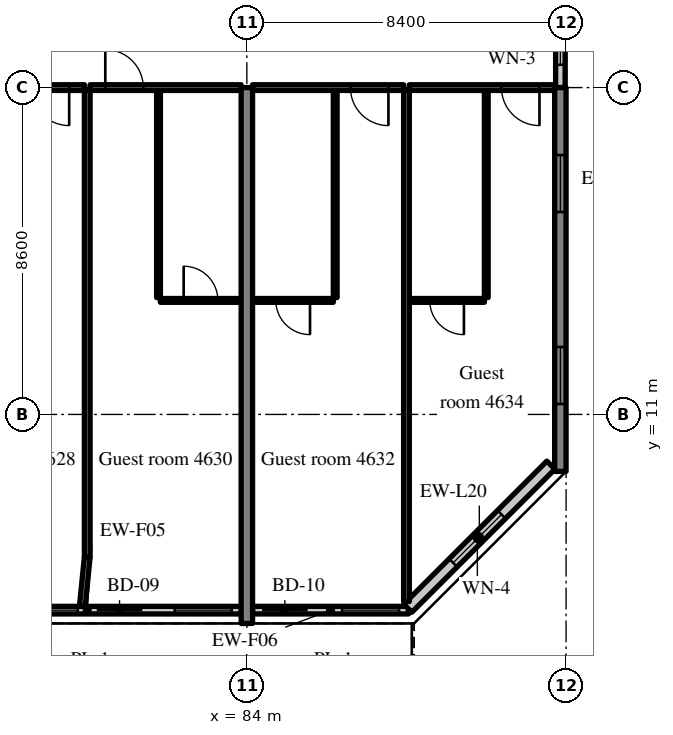
"""IFC4 building model, lengths in metres.
Left out: names, types, materials, properties, quantities, classifications, styles, units other than length and angle.
Written with IfcOpenShell. Run it as: python <this file> out.ifc"""

import sys

from ifc_helpers import new_model, si_unit, direction, frame, frame_2d, origin, place, context, subcontext, project, spatial, rectangle, extrude, source, transform, mapped, element, fill, save


model = new_model("IFC4")
c1 = context("Model", 3, precision=1e-05, world=origin(), true_north=direction((0.0, 1.0)))
c2 = subcontext(c1, "Body", "Model", "MODEL_VIEW")
j1 = project(units=[si_unit("LENGTHUNIT", "METRE"), si_unit("PLANEANGLEUNIT", "RADIAN")], contexts=[c1])
p1 = place(None, origin())
s1 = spatial("IfcSite", under=j1, at=p1, CompositionType="ELEMENT")
p2 = place(p1, origin())
s2 = spatial("IfcBuilding", under=s1, at=p2, CompositionType="ELEMENT")
p3 = place(p2, frame((0.0, 0.0, 189.6)))
s3 = spatial("IfcBuildingStorey", under=s2, at=p3, CompositionType="ELEMENT", Elevation=189.6)
m1 = source(origin(), c2, "Body", "SweptSolid", [
    extrude(rectangle(XDim=14.1, YDim=0.3, at=frame_2d((7.05, 0.0))), origin(), (0.0, 0.0, 1.0), 3.52),
])
p4 = place(p3, frame((84.0, 5.5, 0.0), z_axis=(0.0, 0.0, 1.0), x_axis=(0.0, 1.0, 0.0)))
e1 = element("IfcWall", 1, at=p4, inside=s3, PredefinedType="SHEAR", context=c2, shape_type="MappedRepresentation", body=[
    mapped(m1, transform((0.0, 0.0, 0.0), scale=1.0)),
])
m2 = source(origin(), c2, "Body", "SweptSolid", [
    extrude(rectangle(XDim=10.1, YDim=0.3, at=frame_2d((5.05, 0.0))), origin(), (0.0, 0.0, 1.0), 3.52),
])
p5 = place(p3, frame((92.25, 9.5, 0.0), z_axis=(0.0, 0.0, 1.0), x_axis=(0.0, 1.0, 0.0)))
e2 = element("IfcWall", 2, at=p5, inside=s3, PredefinedType="SHEAR", context=c2, shape_type="MappedRepresentation", body=[
    mapped(m2, transform((0.0, 0.0, 0.0), scale=1.0)),
])
m3 = source(origin(), c2, "Body", "SweptSolid", [
    extrude(rectangle(XDim=1.5, YDim=1.5, at=frame_2d((0.75, 0.75))), frame((0.0, 0.16, 0.0), z_axis=(0.0, -1.0, 0.0), x_axis=(1.0, 0.0, 0.0)), (0.0, 0.0, 1.0), 0.32),
])
p6 = place(p5, frame((1.775, 0.0, 0.9)))
e3 = element("IfcOpeningElement", 3, at=p6, cuts=e2, PredefinedType="OPENING", context=c2, shape_type="MappedRepresentation", body=[
    mapped(m3, transform((0.0, 0.0, 0.0), scale=1.0)),
])
p7 = place(p5, frame((6.825, 0.0, 0.9)))
e4 = element("IfcOpeningElement", 4, at=p7, cuts=e2, PredefinedType="OPENING", context=c2, shape_type="MappedRepresentation", body=[
    mapped(m3, transform((0.0, 0.0, 0.0), scale=1.0)),
])
m4 = source(origin(), c2, "Body", "SweptSolid", [
    extrude(rectangle(XDim=8.1, YDim=0.2, at=frame_2d((4.05, 0.0))), origin(), (0.0, 0.0, 1.0), 2.87),
])
p8 = place(p3, frame((75.75, 5.85, 0.0), z_axis=(0.0, 0.0, 1.0), x_axis=(1.0, 0.0, 0.0)))
e5 = element("IfcWall", 5, at=p8, inside=s3, PredefinedType="SOLIDWALL", context=c2, shape_type="MappedRepresentation", body=[
    mapped(m4, transform((0.0, 0.0, 0.0), scale=1.0)),
])
m5 = source(origin(), c2, "Body", "SweptSolid", [
    extrude(rectangle(XDim=1.2, YDim=2.4, at=frame_2d((0.6, 1.2))), frame((0.0, 0.11, 0.0), z_axis=(0.0, -1.0, 0.0), x_axis=(1.0, 0.0, 0.0)), (0.0, 0.0, 1.0), 0.22),
])
p9 = place(p8, frame((0.25, 0.0, 0.0)))
e6 = element("IfcOpeningElement", 6, at=p9, cuts=e5, PredefinedType="OPENING", context=c2, shape_type="MappedRepresentation", body=[
    mapped(m5, transform((0.0, 0.0, 0.0), scale=1.0)),
])
m6 = source(origin(), c2, "Body", "SweptSolid", [
    extrude(rectangle(XDim=1.5, YDim=1.5, at=frame_2d((0.75, 0.75))), frame((0.0, 0.11, 0.0), z_axis=(0.0, -1.0, 0.0), x_axis=(1.0, 0.0, 0.0)), (0.0, 0.0, 1.0), 0.22),
])
p10 = place(p8, frame((2.3, 0.0, 0.9)))
e7 = element("IfcOpeningElement", 7, at=p10, cuts=e5, PredefinedType="OPENING", context=c2, shape_type="MappedRepresentation", body=[
    mapped(m6, transform((0.0, 0.0, 0.0), scale=1.0)),
])
p11 = place(p8, frame((4.3, 0.0, 0.0)))
e8 = element("IfcOpeningElement", 8, at=p11, cuts=e5, PredefinedType="OPENING", context=c2, shape_type="MappedRepresentation", body=[
    mapped(m5, transform((0.0, 0.0, 0.0), scale=1.0)),
])
p12 = place(p8, frame((6.35, 0.0, 0.9)))
e9 = element("IfcOpeningElement", 9, at=p12, cuts=e5, PredefinedType="OPENING", context=c2, shape_type="MappedRepresentation", body=[
    mapped(m6, transform((0.0, 0.0, 0.0), scale=1.0)),
])
m7 = source(origin(), c2, "Body", "SweptSolid", [
    extrude(rectangle(XDim=4.105, YDim=0.2, at=frame_2d((2.052, 0.0))), origin(), (0.0, 0.0, 1.0), 2.87),
])
p13 = place(p3, frame((84.15, 5.85, 0.0), z_axis=(0.0, 0.0, 1.0), x_axis=(1.0, 0.0, 0.0)))
e10 = element("IfcWall", 10, at=p13, inside=s3, PredefinedType="SOLIDWALL", context=c2, shape_type="MappedRepresentation", body=[
    mapped(m7, transform((0.0, 0.0, 0.0), scale=1.0)),
])
p14 = place(p13, frame((0.25, 0.0, 0.0)))
e11 = element("IfcOpeningElement", 11, at=p14, cuts=e10, PredefinedType="OPENING", context=c2, shape_type="MappedRepresentation", body=[
    mapped(m5, transform((0.0, 0.0, 0.0), scale=1.0)),
])
p15 = place(p13, frame((2.355, 0.0, 0.9)))
e12 = element("IfcOpeningElement", 12, at=p15, cuts=e10, PredefinedType="OPENING", context=c2, shape_type="MappedRepresentation", body=[
    mapped(m6, transform((0.0, 0.0, 0.0), scale=1.0)),
])
m8 = source(origin(), c2, "Body", "SweptSolid", [
    extrude(rectangle(XDim=5.326, YDim=0.3, at=frame_2d((2.663, 0.0))), origin(), (0.0, 0.0, 1.0), 3.52),
])
p16 = place(p3, frame((88.234, 5.9, 0.0), z_axis=(0.0, 0.0, 1.0), x_axis=(0.707083859269, 0.707129702361, 0.0)))
e13 = element("IfcWall", 13, at=p16, inside=s3, PredefinedType="SOLIDWALL", context=c2, shape_type="MappedRepresentation", body=[
    mapped(m8, transform((0.0, 0.0, 0.0), scale=1.0)),
])
m9 = source(origin(), c2, "Body", "SweptSolid", [
    extrude(rectangle(XDim=1.8, YDim=1.5, at=frame_2d((0.9, 0.75))), frame((0.0, 0.16, 0.0), z_axis=(0.0, -1.0, 0.0), x_axis=(1.0, 0.0, 0.0)), (0.0, 0.0, 1.0), 0.32),
])
p17 = place(p16, frame((1.689, 0.0, 0.9)))
e14 = element("IfcOpeningElement", 14, at=p17, cuts=e13, PredefinedType="OPENING", context=c2, shape_type="MappedRepresentation", body=[
    mapped(m9, transform((0.0, 0.0, 0.0), scale=1.0)),
])
m10 = source(origin(), c2, "Body", "SweptSolid", [
    extrude(rectangle(XDim=2.4, YDim=0.25, at=frame_2d((1.2, 0.0))), origin(), (0.0, 0.0, 1.0), 2.62),
])
p18 = place(p3, frame((92.25, 19.6, 0.0), z_axis=(0.0, 0.0, 1.0), x_axis=(0.0, 1.0, 0.0)))
e15 = element("IfcWall", 15, at=p18, inside=s3, PredefinedType="SOLIDWALL", context=c2, shape_type="MappedRepresentation", body=[
    mapped(m10, transform((0.0, 0.0, 0.0), scale=1.0)),
])
m11 = source(origin(), c2, "Body", "SweptSolid", [
    extrude(rectangle(XDim=1.2, YDim=1.5, at=frame_2d((0.6, 0.75))), frame((0.0, 0.135, 0.0), z_axis=(0.0, -1.0, 0.0), x_axis=(1.0, 0.0, 0.0)), (0.0, 0.0, 1.0), 0.27),
])
p19 = place(p18, frame((0.6, 0.0, 0.9)))
e16 = element("IfcOpeningElement", 16, at=p19, cuts=e15, PredefinedType="OPENING", context=c2, shape_type="MappedRepresentation", body=[
    mapped(m11, transform((0.0, 0.0, 0.0), scale=1.0)),
])
m12 = source(origin(), c2, "Body", "SweptSolid", [
    extrude(rectangle(XDim=3.975, YDim=0.15, at=frame_2d((1.988, 0.0))), origin(), (0.0, 0.0, 1.0), 2.82),
])
p20 = place(p3, frame((75.75, 19.6, 0.0), z_axis=(0.0, 0.0, 1.0), x_axis=(1.0, 0.0, 0.0)))
e17 = element("IfcWall", 17, at=p20, inside=s3, PredefinedType="PARTITIONING", context=c2, shape_type="MappedRepresentation", body=[
    mapped(m12, transform((0.0, 0.0, 0.0), scale=1.0)),
])
m13 = source(origin(), c2, "Body", "SweptSolid", [
    extrude(rectangle(XDim=1.0, YDim=2.1, at=frame_2d((0.5, 1.05))), frame((0.0, 0.085, 0.0), z_axis=(0.0, -1.0, 0.0), x_axis=(1.0, 0.0, 0.0)), (0.0, 0.0, 1.0), 0.17),
])
p21 = place(p20, frame((2.575, 0.0, 0.0)))
e18 = element("IfcOpeningElement", 18, at=p21, cuts=e17, PredefinedType="OPENING", context=c2, shape_type="MappedRepresentation", body=[
    mapped(m13, transform((0.0, 0.0, 0.0), scale=1.0)),
])
m14 = source(origin(), c2, "Body", "SweptSolid", [
    extrude(rectangle(XDim=5.45, YDim=0.1, at=frame_2d((2.725, 0.0))), origin(), (0.0, 0.0, 1.0), 3.52),
])
p22 = place(p3, frame((81.675, 14.075, 0.0), z_axis=(0.0, 0.0, 1.0), x_axis=(0.0, 1.0, 0.0)))
e19 = element("IfcWall", 19, at=p22, inside=s3, PredefinedType="PARTITIONING", context=c2, shape_type="MappedRepresentation", body=[
    mapped(m14, transform((0.0, 0.0, 0.0), scale=1.0)),
])
m15 = source(origin(), c2, "Body", "SweptSolid", [
    extrude(rectangle(XDim=2.125, YDim=0.1, at=frame_2d((1.062, 0.0))), origin(), (0.0, 0.0, 1.0), 3.52),
])
p23 = place(p3, frame((81.725, 14.0, 0.0), z_axis=(0.0, 0.0, 1.0), x_axis=(1.0, 0.0, 0.0)))
e20 = element("IfcWall", 20, at=p23, inside=s3, PredefinedType="PARTITIONING", context=c2, shape_type="MappedRepresentation", body=[
    mapped(m15, transform((0.0, 0.0, 0.0), scale=1.0)),
])
m16 = source(origin(), c2, "Body", "SweptSolid", [
    extrude(rectangle(XDim=0.9, YDim=2.1, at=frame_2d((0.45, 1.05))), frame((0.0, 0.06, 0.0), z_axis=(0.0, -1.0, 0.0), x_axis=(1.0, 0.0, 0.0)), (0.0, 0.0, 1.0), 0.12),
])
p24 = place(p23, frame((0.612, 0.0, 0.0)))
e21 = element("IfcOpeningElement", 21, at=p24, cuts=e20, PredefinedType="OPENING", context=c2, shape_type="MappedRepresentation", body=[
    mapped(m16, transform((0.0, 0.0, 0.0), scale=1.0)),
])
p25 = place(p3, frame((79.875, 19.6, 0.0), z_axis=(0.0, 0.0, 1.0), x_axis=(1.0, 0.0, 0.0)))
e22 = element("IfcWall", 22, at=p25, inside=s3, PredefinedType="PARTITIONING", context=c2, shape_type="MappedRepresentation", body=[
    mapped(m12, transform((0.0, 0.0, 0.0), scale=1.0)),
])
p26 = place(p25, frame((0.4, 0.0, 0.0)))
e23 = element("IfcOpeningElement", 23, at=p26, cuts=e22, PredefinedType="OPENING", context=c2, shape_type="MappedRepresentation", body=[
    mapped(m13, transform((0.0, 0.0, 0.0), scale=1.0)),
])
m17 = source(origin(), c2, "Body", "SweptSolid", [
    extrude(rectangle(XDim=12.275, YDim=0.15, at=frame_2d((6.137, 0.0))), origin(), (0.0, 0.0, 1.0), 3.52),
])
p27 = place(p3, frame((79.8, 7.25, 0.0), z_axis=(0.0, 0.0, 1.0), x_axis=(0.0, 1.0, 0.0)))
e24 = element("IfcWall", 24, at=p27, inside=s3, PredefinedType="PARTITIONING", context=c2, shape_type="MappedRepresentation", body=[
    mapped(m17, transform((0.0, 0.0, 0.0), scale=1.0)),
])
p28 = place(p3, frame((86.325, 14.075, 0.0), z_axis=(0.0, 0.0, 1.0), x_axis=(0.0, 1.0, 0.0)))
e25 = element("IfcWall", 25, at=p28, inside=s3, PredefinedType="PARTITIONING", context=c2, shape_type="MappedRepresentation", body=[
    mapped(m14, transform((0.0, 0.0, 0.0), scale=1.0)),
])
p29 = place(p3, frame((84.15, 14.0, 0.0), z_axis=(0.0, 0.0, 1.0), x_axis=(1.0, 0.0, 0.0)))
e26 = element("IfcWall", 26, at=p29, inside=s3, PredefinedType="PARTITIONING", context=c2, shape_type="MappedRepresentation", body=[
    mapped(m15, transform((0.0, 0.0, 0.0), scale=1.0)),
])
p30 = place(p29, frame((0.612, 0.0, 0.0)))
e27 = element("IfcOpeningElement", 27, at=p30, cuts=e26, PredefinedType="OPENING", context=c2, shape_type="MappedRepresentation", body=[
    mapped(m16, transform((0.0, 0.0, 0.0), scale=1.0)),
])
p31 = place(p3, frame((84.15, 19.6, 0.0), z_axis=(0.0, 0.0, 1.0), x_axis=(1.0, 0.0, 0.0)))
e28 = element("IfcWall", 28, at=p31, inside=s3, PredefinedType="PARTITIONING", context=c2, shape_type="MappedRepresentation", body=[
    mapped(m12, transform((0.0, 0.0, 0.0), scale=1.0)),
])
p32 = place(p31, frame((2.575, 0.0, 0.0)))
e29 = element("IfcOpeningElement", 29, at=p32, cuts=e28, PredefinedType="OPENING", context=c2, shape_type="MappedRepresentation", body=[
    mapped(m13, transform((0.0, 0.0, 0.0), scale=1.0)),
])
p33 = place(p3, frame((90.3, 14.075, 0.0), z_axis=(0.0, 0.0, 1.0), x_axis=(0.0, 1.0, 0.0)))
e30 = element("IfcWall", 30, at=p33, inside=s3, PredefinedType="PARTITIONING", context=c2, shape_type="MappedRepresentation", body=[
    mapped(m14, transform((0.0, 0.0, 0.0), scale=1.0)),
])
m18 = source(origin(), c2, "Body", "SweptSolid", [
    extrude(rectangle(XDim=1.975, YDim=0.1, at=frame_2d((0.988, 0.0))), origin(), (0.0, 0.0, 1.0), 3.52),
])
p34 = place(p3, frame((88.275, 14.0, 0.0), z_axis=(0.0, 0.0, 1.0), x_axis=(1.0, 0.0, 0.0)))
e31 = element("IfcWall", 31, at=p34, inside=s3, PredefinedType="PARTITIONING", context=c2, shape_type="MappedRepresentation", body=[
    mapped(m18, transform((0.0, 0.0, 0.0), scale=1.0)),
])
p35 = place(p34, frame((0.537, 0.0, 0.0)))
e32 = element("IfcOpeningElement", 32, at=p35, cuts=e31, PredefinedType="OPENING", context=c2, shape_type="MappedRepresentation", body=[
    mapped(m16, transform((0.0, 0.0, 0.0), scale=1.0)),
])
m19 = source(origin(), c2, "Body", "SweptSolid", [
    extrude(rectangle(XDim=3.825, YDim=0.15, at=frame_2d((1.913, 0.0))), origin(), (0.0, 0.0, 1.0), 2.82),
])
p36 = place(p3, frame((88.275, 19.6, 0.0), z_axis=(0.0, 0.0, 1.0), x_axis=(1.0, 0.0, 0.0)))
e33 = element("IfcWall", 33, at=p36, inside=s3, PredefinedType="PARTITIONING", context=c2, shape_type="MappedRepresentation", body=[
    mapped(m19, transform((0.0, 0.0, 0.0), scale=1.0)),
])
p37 = place(p36, frame((2.425, 0.0, 0.0)))
e34 = element("IfcOpeningElement", 34, at=p37, cuts=e33, PredefinedType="OPENING", context=c2, shape_type="MappedRepresentation", body=[
    mapped(m13, transform((0.0, 0.0, 0.0), scale=1.0)),
])
m20 = source(origin(), c2, "Body", "SweptSolid", [
    extrude(rectangle(XDim=13.447, YDim=0.15, at=frame_2d((6.724, 0.0))), origin(), (0.0, 0.0, 1.0), 3.52),
])
p38 = place(p3, frame((88.2, 6.078, 0.0), z_axis=(0.0, 0.0, 1.0), x_axis=(0.0, 1.0, 0.0)))
e35 = element("IfcWall", 35, at=p38, inside=s3, PredefinedType="PARTITIONING", context=c2, shape_type="MappedRepresentation", body=[
    mapped(m20, transform((0.0, 0.0, 0.0), scale=1.0)),
])
m21 = source(origin(), c2, "Body", "SweptSolid", [
    extrude(rectangle(XDim=1.307, YDim=0.15, at=frame_2d((0.653, 0.0))), origin(), (0.0, 0.0, 1.0), 3.52),
])
p39 = place(p3, frame((79.67, 5.95, 0.0), z_axis=(0.0, 0.0, 1.0), x_axis=(0.099596223396, 0.99502793543, 0.0)))
e36 = element("IfcWall", 36, at=p39, inside=s3, PredefinedType="PARTITIONING", context=c2, shape_type="MappedRepresentation", body=[
    mapped(m21, transform((0.0, 0.0, 0.0), scale=1.0)),
])
m22 = source(origin(), c2, "Body", "SweptSolid", [
    extrude(rectangle(XDim=1.5, YDim=1.5, at=frame_2d((0.75, 0.75))), frame((0.0, 0.03, 0.0), z_axis=(0.0, -1.0, 0.0), x_axis=(1.0, 0.0, 0.0)), (0.0, 0.0, 1.0), 0.06),
])
p40 = place(p10, origin())
e37 = element("IfcWindow", 37, at=p40, inside=s3, PartitioningType="SINGLE_PANEL", PredefinedType="WINDOW", context=c2, shape_type="MappedRepresentation", body=[
    mapped(m22, transform((0.0, 0.0, 0.0), scale=1.0)),
])
fill(e7, e37)
m23 = source(origin(), c2, "Body", "SweptSolid", [
    extrude(rectangle(XDim=1.2, YDim=2.4, at=frame_2d((0.6, 1.2))), frame((0.0, 0.025, 0.0), z_axis=(0.0, -1.0, 0.0), x_axis=(1.0, 0.0, 0.0)), (0.0, 0.0, 1.0), 0.05),
])
p41 = place(p11, origin())
e38 = element("IfcDoor", 38, at=p41, inside=s3, OperationType="SLIDING_TO_LEFT", PredefinedType="DOOR", context=c2, shape_type="MappedRepresentation", body=[
    mapped(m23, transform((0.0, 0.0, 0.0), scale=1.0)),
])
fill(e8, e38)
p42 = place(p12, origin())
e39 = element("IfcWindow", 39, at=p42, inside=s3, PartitioningType="SINGLE_PANEL", PredefinedType="WINDOW", context=c2, shape_type="MappedRepresentation", body=[
    mapped(m22, transform((0.0, 0.0, 0.0), scale=1.0)),
])
fill(e9, e39)
p43 = place(p14, origin())
e40 = element("IfcDoor", 40, at=p43, inside=s3, OperationType="SLIDING_TO_RIGHT", PredefinedType="DOOR", context=c2, shape_type="MappedRepresentation", body=[
    mapped(m23, transform((0.0, 0.0, 0.0), scale=1.0)),
])
fill(e11, e40)
p44 = place(p15, origin())
e41 = element("IfcWindow", 41, at=p44, inside=s3, PartitioningType="SINGLE_PANEL", PredefinedType="WINDOW", context=c2, shape_type="MappedRepresentation", body=[
    mapped(m22, transform((0.0, 0.0, 0.0), scale=1.0)),
])
fill(e12, e41)
m24 = source(origin(), c2, "Body", "SweptSolid", [
    extrude(rectangle(XDim=1.8, YDim=1.5, at=frame_2d((0.9, 0.75))), frame((0.0, 0.03, 0.0), z_axis=(0.0, -1.0, 0.0), x_axis=(1.0, 0.0, 0.0)), (0.0, 0.0, 1.0), 0.06),
])
p45 = place(p17, origin())
e42 = element("IfcWindow", 42, at=p45, inside=s3, PartitioningType="SINGLE_PANEL", PredefinedType="WINDOW", context=c2, shape_type="MappedRepresentation", body=[
    mapped(m24, transform((0.0, 0.0, 0.0), scale=1.0)),
])
fill(e14, e42)
p46 = place(p6, origin())
e43 = element("IfcWindow", 43, at=p46, inside=s3, PartitioningType="SINGLE_PANEL", PredefinedType="WINDOW", context=c2, shape_type="MappedRepresentation", body=[
    mapped(m22, transform((0.0, 0.0, 0.0), scale=1.0)),
])
fill(e3, e43)
p47 = place(p7, origin())
e44 = element("IfcWindow", 44, at=p47, inside=s3, PartitioningType="SINGLE_PANEL", PredefinedType="WINDOW", context=c2, shape_type="MappedRepresentation", body=[
    mapped(m22, transform((0.0, 0.0, 0.0), scale=1.0)),
])
fill(e4, e44)
m25 = source(origin(), c2, "Body", "SweptSolid", [
    extrude(rectangle(XDim=1.2, YDim=1.5, at=frame_2d((0.6, 0.75))), frame((0.0, 0.03, 0.0), z_axis=(0.0, -1.0, 0.0), x_axis=(1.0, 0.0, 0.0)), (0.0, 0.0, 1.0), 0.06),
])
p48 = place(p19, origin())
e45 = element("IfcWindow", 45, at=p48, inside=s3, PartitioningType="SINGLE_PANEL", PredefinedType="WINDOW", context=c2, shape_type="MappedRepresentation", body=[
    mapped(m25, transform((0.0, 0.0, 0.0), scale=1.0)),
])
fill(e16, e45)
m26 = source(origin(), c2, "Body", "SweptSolid", [
    extrude(rectangle(XDim=1.0, YDim=2.1, at=frame_2d((0.5, 1.05))), frame((0.0, 0.025, 0.0), z_axis=(0.0, -1.0, 0.0), x_axis=(1.0, 0.0, 0.0)), (0.0, 0.0, 1.0), 0.05),
])
p49 = place(p21, origin())
e46 = element("IfcDoor", 46, at=p49, inside=s3, OperationType="SINGLE_SWING_RIGHT", PredefinedType="DOOR", context=c2, shape_type="MappedRepresentation", body=[
    mapped(m26, transform((0.0, 0.0, 0.0), scale=1.0)),
])
fill(e18, e46)
m27 = source(origin(), c2, "Body", "SweptSolid", [
    extrude(rectangle(XDim=0.9, YDim=2.1, at=frame_2d((0.45, 1.05))), frame((0.0, 0.025, 0.0), z_axis=(0.0, -1.0, 0.0), x_axis=(1.0, 0.0, 0.0)), (0.0, 0.0, 1.0), 0.05),
])
p50 = place(p24, origin())
e47 = element("IfcDoor", 47, at=p50, inside=s3, OperationType="SINGLE_SWING_LEFT", PredefinedType="DOOR", context=c2, shape_type="MappedRepresentation", body=[
    mapped(m27, transform((0.0, 0.0, 0.0), scale=1.0)),
])
fill(e21, e47)
p51 = place(p26, origin())
e48 = element("IfcDoor", 48, at=p51, inside=s3, OperationType="SINGLE_SWING_LEFT", PredefinedType="DOOR", context=c2, shape_type="MappedRepresentation", body=[
    mapped(m26, transform((0.0, 0.0, 0.0), scale=1.0)),
])
fill(e23, e48)
p52 = place(p30, origin())
e49 = element("IfcDoor", 49, at=p52, inside=s3, OperationType="SINGLE_SWING_RIGHT", PredefinedType="DOOR", context=c2, shape_type="MappedRepresentation", body=[
    mapped(m27, transform((0.0, 0.0, 0.0), scale=1.0)),
])
fill(e27, e49)
p53 = place(p32, origin())
e50 = element("IfcDoor", 50, at=p53, inside=s3, OperationType="SINGLE_SWING_RIGHT", PredefinedType="DOOR", context=c2, shape_type="MappedRepresentation", body=[
    mapped(m26, transform((0.0, 0.0, 0.0), scale=1.0)),
])
fill(e29, e50)
p54 = place(p35, origin())
e51 = element("IfcDoor", 51, at=p54, inside=s3, OperationType="SINGLE_SWING_RIGHT", PredefinedType="DOOR", context=c2, shape_type="MappedRepresentation", body=[
    mapped(m27, transform((0.0, 0.0, 0.0), scale=1.0)),
])
fill(e32, e51)
p55 = place(p37, origin())
e52 = element("IfcDoor", 52, at=p55, inside=s3, OperationType="SINGLE_SWING_RIGHT", PredefinedType="DOOR", context=c2, shape_type="MappedRepresentation", body=[
    mapped(m26, transform((0.0, 0.0, 0.0), scale=1.0)),
])
fill(e34, e52)
save(model, sys.argv[1])
